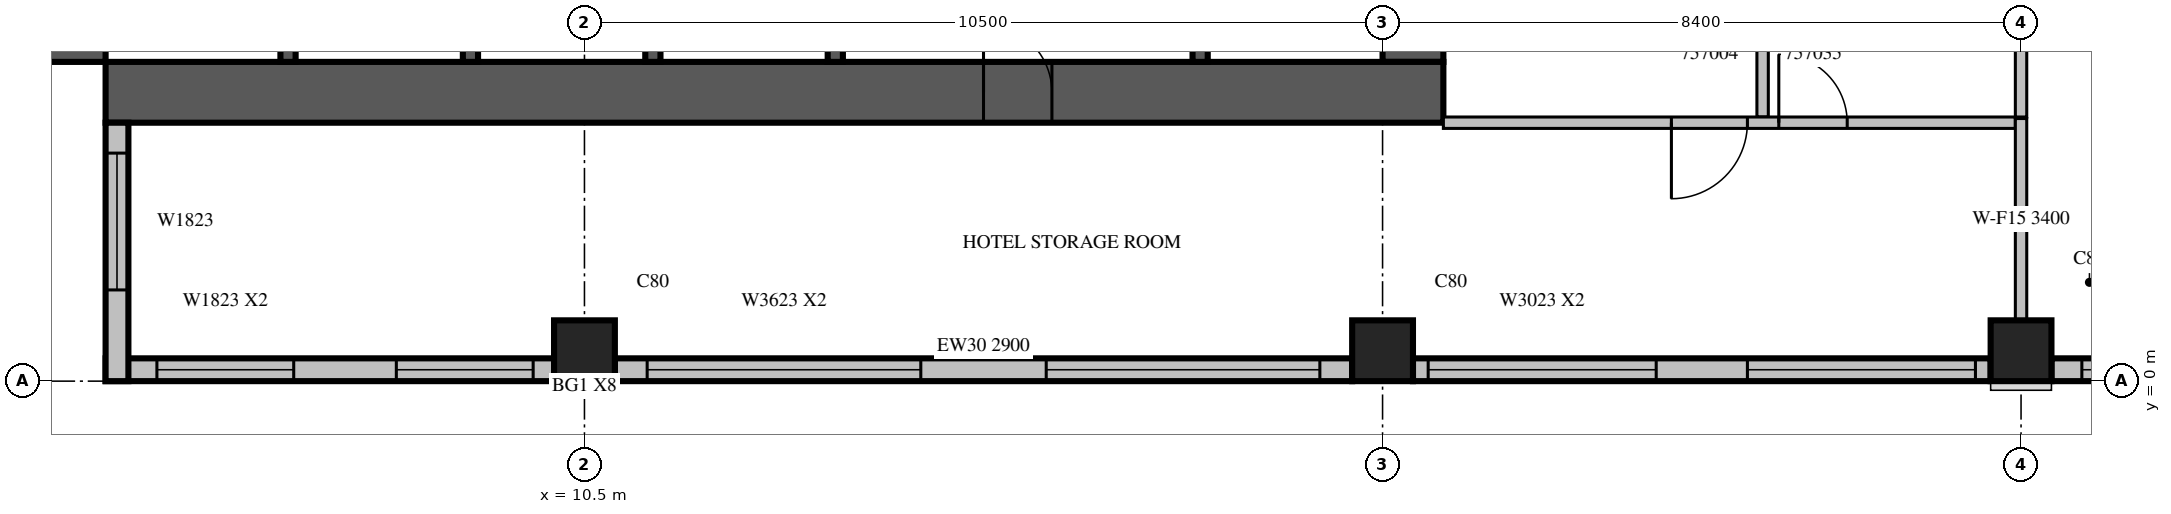
"""IFC4 building model, lengths in metres.
Left out: names, types, materials, properties, quantities, classifications, styles, units other than length and angle.
Written with IfcOpenShell. Run it as: python <this file> out.ifc"""

import sys

from ifc_helpers import new_model, si_unit, direction, frame, frame_2d, origin, origin_2d, place, context, subcontext, project, spatial, rectangle, extrude, source, transform, mapped, element, fill, save


model = new_model("IFC4")
c1 = context("Model", 3, precision=1e-05, world=origin(), true_north=direction((0.0, 1.0)))
c2 = subcontext(c1, "Body", "Model", "MODEL_VIEW")
j1 = project(units=[si_unit("LENGTHUNIT", "METRE"), si_unit("PLANEANGLEUNIT", "RADIAN")], contexts=[c1])
p1 = place(None, origin())
s1 = spatial("IfcSite", under=j1, at=p1, CompositionType="ELEMENT")
p2 = place(p1, origin())
s2 = spatial("IfcBuilding", under=s1, at=p2, CompositionType="ELEMENT")
p3 = place(p2, frame((0.0, 0.0, 250.0)))
s3 = spatial("IfcBuildingStorey", under=s2, at=p3, CompositionType="ELEMENT", Elevation=250.0)
m1 = source(origin(), c2, "Body", "SweptSolid", [
    extrude(rectangle(XDim=0.8, YDim=0.8, at=origin_2d()), origin(), (0.0, 0.0, 1.0), 3.8),
])
for number, where, z_axis, x_axis in (
    (1, (10.5, 0.4, 0.0), (0.0, 0.0, 1.0), (1.0, 0.0, 0.0)),
    (2, (21.0, 0.4, 0.0), (0.0, 0.0, 1.0), (1.0, 0.0, 0.0)),
    (3, (29.4, 0.4, 0.0), (0.0, 0.0, 1.0), (1.0, 0.0, 0.0)),
):
    element("IfcColumn", number, at=place(p3, frame(where, z_axis=z_axis, x_axis=x_axis)), inside=s3, PredefinedType="COLUMN", context=c2, shape_type="MappedRepresentation", body=[
        mapped(m1, transform((0.0, 0.0, 0.0), scale=1.0)),
    ])
m2 = source(origin(), c2, "Body", "SweptSolid", [
    extrude(rectangle(XDim=17.6, YDim=0.8, at=frame_2d((8.8, 0.0))), origin(), (0.0, 0.0, 1.0), 3.8),
])
p4 = place(p3, frame((3.8, 4.2, 0.0), z_axis=(0.0, 0.0, 1.0), x_axis=(0.0, 1.0, 0.0)))
e4 = element("IfcWall", 4, at=p4, inside=s3, PredefinedType="SHEAR", context=c2, shape_type="MappedRepresentation", body=[
    mapped(m2, transform((0.0, 0.0, 0.0), scale=1.0)),
])
m3 = source(origin(), c2, "Body", "SweptSolid", [
    extrude(rectangle(XDim=2.2, YDim=2.1, at=frame_2d((1.1, 1.05))), frame((0.0, 0.41, 0.0), z_axis=(0.0, -1.0, 0.0), x_axis=(1.0, 0.0, 0.0)), (0.0, 0.0, 1.0), 0.82),
])
p5 = place(p4, frame((4.2, 0.0, 0.0)))
e5 = element("IfcOpeningElement", 5, at=p5, cuts=e4, PredefinedType="OPENING", context=c2, shape_type="MappedRepresentation", body=[
    mapped(m3, transform((0.0, 0.0, 0.0), scale=1.0)),
])
m4 = source(origin(), c2, "Body", "SweptSolid", [
    extrude(rectangle(XDim=0.9, YDim=2.1, at=frame_2d((0.45, 1.05))), frame((0.0, 0.41, 0.0), z_axis=(0.0, -1.0, 0.0), x_axis=(1.0, 0.0, 0.0)), (0.0, 0.0, 1.0), 0.82),
])
p6 = place(p4, frame((10.95, 0.0, 0.0)))
e6 = element("IfcOpeningElement", 6, at=p6, cuts=e4, PredefinedType="OPENING", context=c2, shape_type="MappedRepresentation", body=[
    mapped(m4, transform((0.0, 0.0, 0.0), scale=1.0)),
])
m5 = source(origin(), c2, "Body", "SweptSolid", [
    extrude(rectangle(XDim=16.8, YDim=0.8, at=frame_2d((8.4, 0.0))), origin(), (0.0, 0.0, 1.0), 3.8),
])
p7 = place(p3, frame((21.4, 4.2, 0.0), z_axis=(0.0, 0.0, 1.0), x_axis=(0.0, 1.0, 0.0)))
e7 = element("IfcWall", 7, at=p7, inside=s3, PredefinedType="SHEAR", context=c2, shape_type="MappedRepresentation", body=[
    mapped(m5, transform((0.0, 0.0, 0.0), scale=1.0)),
])
p8 = place(p7, frame((4.2, 0.0, 0.0)))
e8 = element("IfcOpeningElement", 8, at=p8, cuts=e7, PredefinedType="OPENING", context=c2, shape_type="MappedRepresentation", body=[
    mapped(m3, transform((0.0, 0.0, 0.0), scale=1.0)),
])
m6 = source(origin(), c2, "Body", "SweptSolid", [
    extrude(rectangle(XDim=1.2, YDim=2.1, at=frame_2d((0.6, 1.05))), frame((0.0, 0.41, 0.0), z_axis=(0.0, -1.0, 0.0), x_axis=(1.0, 0.0, 0.0)), (0.0, 0.0, 1.0), 0.82),
])
p9 = place(p7, frame((14.7, 0.0, 0.0)))
e9 = element("IfcOpeningElement", 9, at=p9, cuts=e7, PredefinedType="OPENING", context=c2, shape_type="MappedRepresentation", body=[
    mapped(m6, transform((0.0, 0.0, 0.0), scale=1.0)),
])
p10 = place(p3, frame((4.2, 3.8, 0.0), z_axis=(0.0, 0.0, 1.0), x_axis=(1.0, 0.0, 0.0)))
e10 = element("IfcWall", 10, at=p10, inside=s3, PredefinedType="SHEAR", context=c2, shape_type="MappedRepresentation", body=[
    mapped(m2, transform((0.0, 0.0, 0.0), scale=1.0)),
])
p11 = place(p10, frame((11.55, 0.0, 0.0)))
e11 = element("IfcOpeningElement", 11, at=p11, cuts=e10, PredefinedType="OPENING", context=c2, shape_type="MappedRepresentation", body=[
    mapped(m4, transform((0.0, 0.0, 0.0), scale=1.0)),
])
m7 = source(origin(), c2, "Body", "SweptSolid", [
    extrude(rectangle(XDim=5.9, YDim=0.3, at=frame_2d((2.95, 0.0))), origin(), (0.0, 0.0, 1.0), 3.4),
])
p12 = place(p3, frame((4.2, 0.15, 0.0), z_axis=(0.0, 0.0, 1.0), x_axis=(1.0, 0.0, 0.0)))
e12 = element("IfcWall", 12, at=p12, inside=s3, PredefinedType="STANDARD", context=c2, shape_type="MappedRepresentation", body=[
    mapped(m7, transform((0.0, 0.0, 0.0), scale=1.0)),
])
m8 = source(origin(), c2, "Body", "SweptSolid", [
    extrude(rectangle(XDim=1.8, YDim=2.3, at=frame_2d((0.9, 1.15))), frame((0.0, 0.16, 0.0), z_axis=(0.0, -1.0, 0.0), x_axis=(1.0, 0.0, 0.0)), (0.0, 0.0, 1.0), 0.32),
])
p13 = place(p12, frame((0.675, 0.0, 0.6)))
e13 = element("IfcOpeningElement", 13, at=p13, cuts=e12, PredefinedType="OPENING", context=c2, shape_type="MappedRepresentation", body=[
    mapped(m8, transform((0.0, 0.0, 0.0), scale=1.0)),
])
p14 = place(p12, frame((3.825, 0.0, 0.6)))
e14 = element("IfcOpeningElement", 14, at=p14, cuts=e12, PredefinedType="OPENING", context=c2, shape_type="MappedRepresentation", body=[
    mapped(m8, transform((0.0, 0.0, 0.0), scale=1.0)),
])
m9 = source(origin(), c2, "Body", "SweptSolid", [
    extrude(rectangle(XDim=9.7, YDim=0.3, at=frame_2d((4.85, 0.0))), origin(), (0.0, 0.0, 1.0), 2.9),
])
p15 = place(p3, frame((10.9, 0.15, 0.0), z_axis=(0.0, 0.0, 1.0), x_axis=(1.0, 0.0, 0.0)))
e15 = element("IfcWall", 15, at=p15, inside=s3, PredefinedType="STANDARD", context=c2, shape_type="MappedRepresentation", body=[
    mapped(m9, transform((0.0, 0.0, 0.0), scale=1.0)),
])
m10 = source(origin(), c2, "Body", "SweptSolid", [
    extrude(rectangle(XDim=3.6, YDim=2.3, at=frame_2d((1.8, 1.15))), frame((0.0, 0.16, 0.0), z_axis=(0.0, -1.0, 0.0), x_axis=(1.0, 0.0, 0.0)), (0.0, 0.0, 1.0), 0.32),
])
p16 = place(p15, frame((0.425, 0.0, 0.6)))
e16 = element("IfcOpeningElement", 16, at=p16, cuts=e15, PredefinedType="OPENING", context=c2, shape_type="MappedRepresentation", body=[
    mapped(m10, transform((0.0, 0.0, 0.0), scale=1.0)),
])
p17 = place(p15, frame((5.675, 0.0, 0.6)))
e17 = element("IfcOpeningElement", 17, at=p17, cuts=e15, PredefinedType="OPENING", context=c2, shape_type="MappedRepresentation", body=[
    mapped(m10, transform((0.0, 0.0, 0.0), scale=1.0)),
])
m11 = source(origin(), c2, "Body", "SweptSolid", [
    extrude(rectangle(XDim=7.6, YDim=0.3, at=frame_2d((3.8, 0.0))), origin(), (0.0, 0.0, 1.0), 3.4),
])
p18 = place(p3, frame((21.4, 0.15, 0.0), z_axis=(0.0, 0.0, 1.0), x_axis=(1.0, 0.0, 0.0)))
e18 = element("IfcWall", 18, at=p18, inside=s3, PredefinedType="STANDARD", context=c2, shape_type="MappedRepresentation", body=[
    mapped(m11, transform((0.0, 0.0, 0.0), scale=1.0)),
])
m12 = source(origin(), c2, "Body", "SweptSolid", [
    extrude(rectangle(XDim=3.0, YDim=2.3, at=frame_2d((1.5, 1.15))), frame((0.0, 0.16, 0.0), z_axis=(0.0, -1.0, 0.0), x_axis=(1.0, 0.0, 0.0)), (0.0, 0.0, 1.0), 0.32),
])
p19 = place(p18, frame((0.2, 0.0, 0.6)))
e19 = element("IfcOpeningElement", 19, at=p19, cuts=e18, PredefinedType="OPENING", context=c2, shape_type="MappedRepresentation", body=[
    mapped(m12, transform((0.0, 0.0, 0.0), scale=1.0)),
])
p20 = place(p18, frame((4.4, 0.0, 0.6)))
e20 = element("IfcOpeningElement", 20, at=p20, cuts=e18, PredefinedType="OPENING", context=c2, shape_type="MappedRepresentation", body=[
    mapped(m12, transform((0.0, 0.0, 0.0), scale=1.0)),
])
m13 = source(origin(), c2, "Body", "SweptSolid", [
    extrude(rectangle(XDim=2.0, YDim=0.3, at=frame_2d((1.0, 0.0))), origin(), (0.0, 0.0, 1.0), 3.4),
])
p21 = place(p3, frame((29.8, 0.15, 0.0), z_axis=(0.0, 0.0, 1.0), x_axis=(1.0, 0.0, 0.0)))
e21 = element("IfcWall", 21, at=p21, inside=s3, PredefinedType="STANDARD", context=c2, shape_type="MappedRepresentation", body=[
    mapped(m13, transform((0.0, 0.0, 0.0), scale=1.0)),
])
m14 = source(origin(), c2, "Body", "SweptSolid", [
    extrude(rectangle(XDim=1.2, YDim=2.3, at=frame_2d((0.6, 1.15))), frame((0.0, 0.16, 0.0), z_axis=(0.0, -1.0, 0.0), x_axis=(1.0, 0.0, 0.0)), (0.0, 0.0, 1.0), 0.32),
])
p22 = place(p21, frame((0.4, 0.0, 0.6)))
e22 = element("IfcOpeningElement", 22, at=p22, cuts=e21, PredefinedType="OPENING", context=c2, shape_type="MappedRepresentation", body=[
    mapped(m14, transform((0.0, 0.0, 0.0), scale=1.0)),
])
m15 = source(origin(), c2, "Body", "SweptSolid", [
    extrude(rectangle(XDim=3.4, YDim=0.3, at=frame_2d((1.7, 0.0))), origin(), (0.0, 0.0, 1.0), 3.4),
])
p23 = place(p3, frame((4.35, 3.4, 0.0), z_axis=(0.0, 0.0, 1.0), x_axis=(0.0, -1.0, 0.0)))
e23 = element("IfcWall", 23, at=p23, inside=s3, PredefinedType="STANDARD", context=c2, shape_type="MappedRepresentation", body=[
    mapped(m15, transform((0.0, 0.0, 0.0), scale=1.0)),
])
p24 = place(p23, frame((0.4, 0.0, 0.6)))
e24 = element("IfcOpeningElement", 24, at=p24, cuts=e23, PredefinedType="OPENING", context=c2, shape_type="MappedRepresentation", body=[
    mapped(m8, transform((0.0, 0.0, 0.0), scale=1.0)),
])
m16 = source(origin(), c2, "Body", "SweptSolid", [
    extrude(rectangle(XDim=3.1, YDim=0.2, at=frame_2d((1.55, 0.0))), origin(), (0.0, 0.0, 1.0), 3.8),
])
for number, where, z_axis, x_axis in (
    (25, (6.6, 4.2, 0.0), (0.0, 0.0, 1.0), (0.0, 1.0, 0.0)),
    (26, (9.0, 4.2, 0.0), (0.0, 0.0, 1.0), (0.0, 1.0, 0.0)),
    (27, (11.4, 4.2, 0.0), (0.0, 0.0, 1.0), (0.0, 1.0, 0.0)),
):
    element("IfcWall", number, at=place(p3, frame(where, z_axis=z_axis, x_axis=x_axis)), inside=s3, PredefinedType="SOLIDWALL", context=c2, shape_type="MappedRepresentation", body=[
        mapped(m16, transform((0.0, 0.0, 0.0), scale=1.0)),
    ])
m17 = source(origin(), c2, "Body", "SweptSolid", [
    extrude(rectangle(XDim=3.1, YDim=0.2, at=frame_2d((1.55, 0.0))), origin(), (0.0, 0.0, 1.0), 3.4),
])
for number, where, z_axis, x_axis in (
    (28, (13.8, 4.2, 0.0), (0.0, 0.0, 1.0), (0.0, 1.0, 0.0)),
    (29, (18.6, 4.2, 0.0), (0.0, 0.0, 1.0), (0.0, 1.0, 0.0)),
):
    element("IfcWall", number, at=place(p3, frame(where, z_axis=z_axis, x_axis=x_axis)), inside=s3, PredefinedType="SOLIDWALL", context=c2, shape_type="MappedRepresentation", body=[
        mapped(m17, transform((0.0, 0.0, 0.0), scale=1.0)),
    ])
m18 = source(origin(), c2, "Body", "SweptSolid", [
    extrude(rectangle(XDim=11.525, YDim=0.15, at=frame_2d((5.763, 0.0))), origin(), (0.0, 0.0, 1.0), 2.4),
])
p25 = place(p3, frame((26.0, 15.0, 0.0), z_axis=(0.0, 0.0, 1.0), x_axis=(0.0, -1.0, 0.0)))
e30 = element("IfcWall", 30, at=p25, inside=s3, PredefinedType="PARTITIONING", context=c2, shape_type="MappedRepresentation", body=[
    mapped(m18, transform((0.0, 0.0, 0.0), scale=1.0)),
])
m19 = source(origin(), c2, "Body", "SweptSolid", [
    extrude(rectangle(XDim=0.9, YDim=2.1, at=frame_2d((0.45, 1.05))), frame((0.0, 0.085, 0.0), z_axis=(0.0, -1.0, 0.0), x_axis=(1.0, 0.0, 0.0)), (0.0, 0.0, 1.0), 0.17),
])
p26 = place(p25, frame((8.162, 0.0, 0.0)))
e31 = element("IfcOpeningElement", 31, at=p26, cuts=e30, PredefinedType="OPENING", context=c2, shape_type="MappedRepresentation", body=[
    mapped(m19, transform((0.0, 0.0, 0.0), scale=1.0)),
])
p27 = place(p25, frame((1.525, 0.0, 0.0)))
e32 = element("IfcOpeningElement", 32, at=p27, cuts=e30, PredefinedType="OPENING", context=c2, shape_type="MappedRepresentation", body=[
    mapped(m19, transform((0.0, 0.0, 0.0), scale=1.0)),
])
m20 = source(origin(), c2, "Body", "SweptSolid", [
    extrude(rectangle(XDim=6.626, YDim=0.15, at=frame_2d((3.313, 0.0))), origin(), (0.0, 0.0, 1.0), 3.4),
])
p28 = place(p3, frame((29.4, 3.475, 0.0), z_axis=(0.0, 0.0, 1.0), x_axis=(0.0, 1.0, 0.0)))
e33 = element("IfcWall", 33, at=p28, inside=s3, PredefinedType="PARTITIONING", context=c2, shape_type="MappedRepresentation", body=[
    mapped(m20, transform((0.0, 0.0, 0.0), scale=1.0)),
])
m21 = source(origin(), c2, "Body", "SweptSolid", [
    extrude(rectangle(XDim=7.525, YDim=0.15, at=frame_2d((3.763, 0.0))), origin(), (0.0, 0.0, 1.0), 3.4),
])
p29 = place(p3, frame((21.8, 3.4, 0.0), z_axis=(0.0, 0.0, 1.0), x_axis=(1.0, 0.0, 0.0)))
e34 = element("IfcWall", 34, at=p29, inside=s3, PredefinedType="PARTITIONING", context=c2, shape_type="MappedRepresentation", body=[
    mapped(m21, transform((0.0, 0.0, 0.0), scale=1.0)),
])
m22 = source(origin(), c2, "Body", "SweptSolid", [
    extrude(rectangle(XDim=1.0, YDim=2.1, at=frame_2d((0.5, 1.05))), frame((0.0, 0.085, 0.0), z_axis=(0.0, -1.0, 0.0), x_axis=(1.0, 0.0, 0.0)), (0.0, 0.0, 1.0), 0.17),
])
p30 = place(p29, frame((3.0, 0.0, 0.0)))
e35 = element("IfcOpeningElement", 35, at=p30, cuts=e34, PredefinedType="OPENING", context=c2, shape_type="MappedRepresentation", body=[
    mapped(m22, transform((0.0, 0.0, 0.0), scale=1.0)),
])
p31 = place(p29, frame((4.413, 0.0, 0.0)))
e36 = element("IfcOpeningElement", 36, at=p31, cuts=e34, PredefinedType="OPENING", context=c2, shape_type="MappedRepresentation", body=[
    mapped(m19, transform((0.0, 0.0, 0.0), scale=1.0)),
])
m23 = source(origin(), c2, "Body", "SweptSolid", [
    extrude(rectangle(XDim=2.656, YDim=0.15, at=frame_2d((1.328, 0.0))), origin(), (0.0, 0.0, 1.0), 3.4),
])
p32 = place(p3, frame((29.4, 0.799, 0.0), z_axis=(0.0, 0.0, 1.0), x_axis=(0.0, 1.0, 0.0)))
e37 = element("IfcWall", 37, at=p32, inside=s3, PredefinedType="PARTITIONING", context=c2, shape_type="MappedRepresentation", body=[
    mapped(m23, transform((0.0, 0.0, 0.0), scale=1.0)),
])
m24 = source(origin(), c2, "Body", "SweptSolid", [
    extrude(rectangle(XDim=1.8, YDim=2.3, at=frame_2d((0.9, 1.15))), frame((0.0, 0.03, 0.0), z_axis=(0.0, -1.0, 0.0), x_axis=(1.0, 0.0, 0.0)), (0.0, 0.0, 1.0), 0.06),
])
p33 = place(p13, origin())
e38 = element("IfcWindow", 38, at=p33, inside=s3, PartitioningType="SINGLE_PANEL", PredefinedType="WINDOW", context=c2, shape_type="MappedRepresentation", body=[
    mapped(m24, transform((0.0, 0.0, 0.0), scale=1.0)),
])
fill(e13, e38)
p34 = place(p14, origin())
e39 = element("IfcWindow", 39, at=p34, inside=s3, PartitioningType="SINGLE_PANEL", PredefinedType="WINDOW", context=c2, shape_type="MappedRepresentation", body=[
    mapped(m24, transform((0.0, 0.0, 0.0), scale=1.0)),
])
fill(e14, e39)
m25 = source(origin(), c2, "Body", "SweptSolid", [
    extrude(rectangle(XDim=3.6, YDim=2.3, at=frame_2d((1.8, 1.15))), frame((0.0, 0.03, 0.0), z_axis=(0.0, -1.0, 0.0), x_axis=(1.0, 0.0, 0.0)), (0.0, 0.0, 1.0), 0.06),
])
p35 = place(p16, origin())
e40 = element("IfcWindow", 40, at=p35, inside=s3, PartitioningType="SINGLE_PANEL", PredefinedType="WINDOW", context=c2, shape_type="MappedRepresentation", body=[
    mapped(m25, transform((0.0, 0.0, 0.0), scale=1.0)),
])
fill(e16, e40)
p36 = place(p17, origin())
e41 = element("IfcWindow", 41, at=p36, inside=s3, PartitioningType="SINGLE_PANEL", PredefinedType="WINDOW", context=c2, shape_type="MappedRepresentation", body=[
    mapped(m25, transform((0.0, 0.0, 0.0), scale=1.0)),
])
fill(e17, e41)
m26 = source(origin(), c2, "Body", "SweptSolid", [
    extrude(rectangle(XDim=3.0, YDim=2.3, at=frame_2d((1.5, 1.15))), frame((0.0, 0.03, 0.0), z_axis=(0.0, -1.0, 0.0), x_axis=(1.0, 0.0, 0.0)), (0.0, 0.0, 1.0), 0.06),
])
p37 = place(p19, origin())
e42 = element("IfcWindow", 42, at=p37, inside=s3, PartitioningType="SINGLE_PANEL", PredefinedType="WINDOW", context=c2, shape_type="MappedRepresentation", body=[
    mapped(m26, transform((0.0, 0.0, 0.0), scale=1.0)),
])
fill(e19, e42)
p38 = place(p20, origin())
e43 = element("IfcWindow", 43, at=p38, inside=s3, PartitioningType="SINGLE_PANEL", PredefinedType="WINDOW", context=c2, shape_type="MappedRepresentation", body=[
    mapped(m26, transform((0.0, 0.0, 0.0), scale=1.0)),
])
fill(e20, e43)
m27 = source(origin(), c2, "Body", "SweptSolid", [
    extrude(rectangle(XDim=1.2, YDim=2.3, at=frame_2d((0.6, 1.15))), frame((0.0, 0.03, 0.0), z_axis=(0.0, -1.0, 0.0), x_axis=(1.0, 0.0, 0.0)), (0.0, 0.0, 1.0), 0.06),
])
p39 = place(p22, origin())
e44 = element("IfcWindow", 44, at=p39, inside=s3, PartitioningType="SINGLE_PANEL", PredefinedType="WINDOW", context=c2, shape_type="MappedRepresentation", body=[
    mapped(m27, transform((0.0, 0.0, 0.0), scale=1.0)),
])
fill(e22, e44)
p40 = place(p24, origin())
e45 = element("IfcWindow", 45, at=p40, inside=s3, PartitioningType="SINGLE_PANEL", PredefinedType="WINDOW", context=c2, shape_type="MappedRepresentation", body=[
    mapped(m24, transform((0.0, 0.0, 0.0), scale=1.0)),
])
fill(e24, e45)
m28 = source(origin(), c2, "Body", "SweptSolid", [
    extrude(rectangle(XDim=0.9, YDim=2.1, at=frame_2d((0.45, 1.05))), frame((0.0, 0.025, 0.0), z_axis=(0.0, -1.0, 0.0), x_axis=(1.0, 0.0, 0.0)), (0.0, 0.0, 1.0), 0.05),
])
p41 = place(p11, origin())
e46 = element("IfcDoor", 46, at=p41, inside=s3, OperationType="SINGLE_SWING_LEFT", PredefinedType="DOOR", context=c2, shape_type="MappedRepresentation", body=[
    mapped(m28, transform((0.0, 0.0, 0.0), scale=1.0)),
])
fill(e11, e46)
m29 = source(origin(), c2, "Body", "SweptSolid", [
    extrude(rectangle(XDim=1.0, YDim=2.1, at=frame_2d((0.5, 1.05))), frame((0.0, 0.025, 0.0), z_axis=(0.0, -1.0, 0.0), x_axis=(1.0, 0.0, 0.0)), (0.0, 0.0, 1.0), 0.05),
])
p42 = place(p30, origin())
e47 = element("IfcDoor", 47, at=p42, inside=s3, OperationType="SINGLE_SWING_RIGHT", PredefinedType="DOOR", context=c2, shape_type="MappedRepresentation", body=[
    mapped(m29, transform((0.0, 0.0, 0.0), scale=1.0)),
])
fill(e35, e47)
p43 = place(p31, origin())
e48 = element("IfcDoor", 48, at=p43, inside=s3, OperationType="SINGLE_SWING_LEFT", PredefinedType="DOOR", context=c2, shape_type="MappedRepresentation", body=[
    mapped(m28, transform((0.0, 0.0, 0.0), scale=1.0)),
])
fill(e36, e48)
save(model, sys.argv[1])
